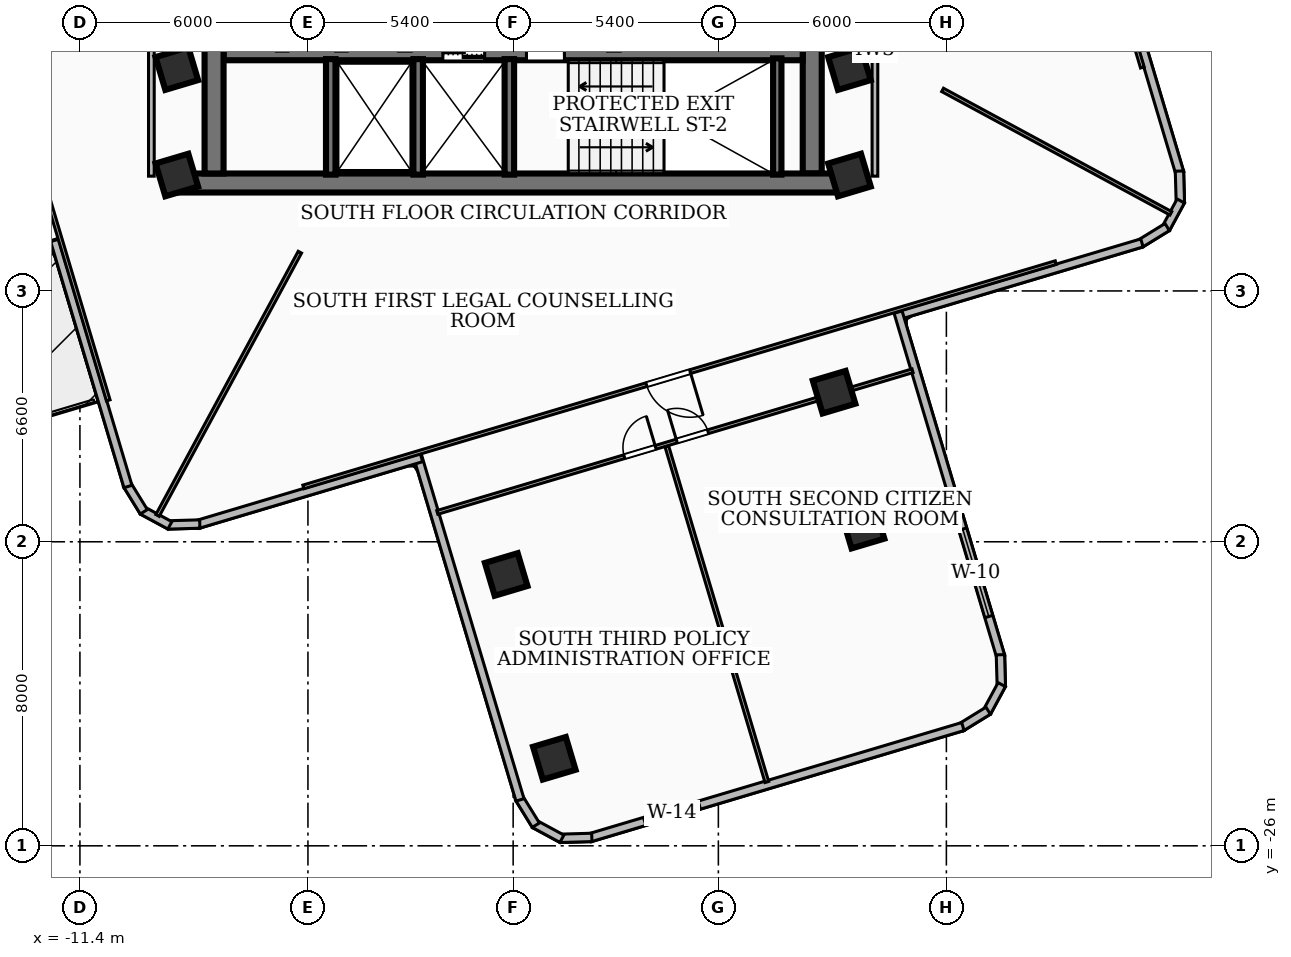
"""IFC4 building model, lengths in metres.
Left out: names, types, materials, properties, quantities, classifications, styles, units other than length and angle.
Written with IfcOpenShell. Run it as: python <this file> out.ifc"""

import sys

from ifc_helpers import new_model, si_unit, direction, frame, frame_2d, origin, origin_2d, place, context, subcontext, project, spatial, rectangle, extrude, element, fill, save


model = new_model("IFC4")
c1 = context("Model", 3, precision=1e-05, world=origin(), true_north=direction((0.0, 1.0)))
c2 = subcontext(c1, "Body", "Model", "MODEL_VIEW")
j1 = project(units=[si_unit("LENGTHUNIT", "METRE"), si_unit("PLANEANGLEUNIT", "RADIAN")], contexts=[c1])
p1 = place(None, origin())
s1 = spatial("IfcSite", under=j1, at=p1, CompositionType="ELEMENT")
p2 = place(p1, origin())
s2 = spatial("IfcBuilding", under=s1, at=p2, CompositionType="ELEMENT")
p3 = place(p2, frame((0.0, 0.0, 145.08)))
s3 = spatial("IfcBuildingStorey", under=s2, at=p3, CompositionType="ELEMENT", Elevation=145.08)
p4 = place(p3, frame((8.78, -8.56, 0.0), z_axis=(0.0, 0.0, 1.0), x_axis=(-1.0, 0.0, 0.0)))
e1 = element("IfcWall", 1, at=p4, inside=s3, PredefinedType="SHEAR", context=c2, shape_type="SweptSolid", body=[
    extrude(rectangle(XDim=17.56, YDim=0.5, at=frame_2d((8.78, 0.0))), origin(), (0.0, 0.0, 1.0), 3.32),
])
for number, where, z_axis, x_axis in (
    (2, (-7.87, -8.31, 0.0), (0.0, 0.0, 1.0), (0.0, 1.0, 0.0)),
    (3, (7.87, -2.0, 0.0), (0.0, 0.0, 1.0), (0.0, -1.0, 0.0)),
):
    element("IfcWall", number, at=place(p3, frame(where, z_axis=z_axis, x_axis=x_axis)), inside=s3, PredefinedType="SHEAR", context=c2, shape_type="SweptSolid", body=[
        extrude(rectangle(XDim=6.31, YDim=0.5, at=frame_2d((3.155, 0.0))), origin(), (0.0, 0.0, 1.0), 3.32),
    ])
p5 = place(p3, frame((-7.62, -5.18, 0.0), z_axis=(0.0, 0.0, 1.0), x_axis=(1.0, 0.0, 0.0)))
e4 = element("IfcWall", 4, at=p5, inside=s3, PredefinedType="SOLIDWALL", context=c2, shape_type="SweptSolid", body=[
    extrude(rectangle(XDim=15.24, YDim=0.3, at=frame_2d((7.62, 0.0))), origin(), (0.0, 0.0, 1.0), 3.32),
])
p6 = place(p5, frame((5.77, 0.0, 0.0)))
e5 = element("IfcOpeningElement", 5, at=p6, cuts=e4, PredefinedType="OPENING", context=c2, shape_type="SweptSolid", body=[
    extrude(rectangle(XDim=1.1, YDim=2.15, at=frame_2d((0.55, 1.075))), frame((0.0, 0.16, 0.0), z_axis=(0.0, -1.0, 0.0), x_axis=(1.0, 0.0, 0.0)), (0.0, 0.0, 1.0), 0.32),
])
p7 = place(p5, frame((7.97, 0.0, 0.0)))
e6 = element("IfcOpeningElement", 6, at=p7, cuts=e4, PredefinedType="OPENING", context=c2, shape_type="SweptSolid", body=[
    extrude(rectangle(XDim=1.0, YDim=2.1, at=frame_2d((0.5, 1.05))), frame((0.0, 0.16, 0.0), z_axis=(0.0, -1.0, 0.0), x_axis=(1.0, 0.0, 0.0)), (0.0, 0.0, 1.0), 0.32),
])
p8 = place(p3, frame((6.95, -8.34, 0.0), z_axis=(0.0, 0.0, 1.0), x_axis=(0.0, 1.0, 0.0)))
e7 = element("IfcWall", 7, at=p8, inside=s3, PredefinedType="SOLIDWALL", context=c2, shape_type="SweptSolid", body=[
    extrude(rectangle(XDim=3.06, YDim=0.22, at=frame_2d((1.53, 0.0))), origin(), (0.0, 0.0, 1.0), 3.32),
])
for number, where, z_axis, x_axis in (
    (8, (-0.1, -8.34, 0.0), (0.0, 0.0, 1.0), (0.0, 1.0, 0.0)),
    (9, (-2.5, -8.34, 0.0), (0.0, 0.0, 1.0), (0.0, 1.0, 0.0)),
    (10, (-4.8, -8.34, 0.0), (0.0, 0.0, 1.0), (0.0, 1.0, 0.0)),
):
    element("IfcWall", number, at=place(p3, frame(where, z_axis=z_axis, x_axis=x_axis)), inside=s3, PredefinedType="SOLIDWALL", context=c2, shape_type="SweptSolid", body=[
        extrude(rectangle(XDim=3.04, YDim=0.25, at=frame_2d((1.52, 0.0))), origin(), (0.0, 0.0, 1.0), 3.32),
    ])
for number, where, z_axis, x_axis in (
    (11, (-8.85, -5.55, 0.0), (0.0, 0.0, 1.0), (0.958, 0.286, 0.0)),
    (12, (8.85, -5.55, 0.0), (0.0, 0.0, 1.0), (0.958, 0.286, 0.0)),
    (13, (8.85, -8.35, 0.0), (0.0, 0.0, 1.0), (0.958, 0.286, 0.0)),
    (14, (-8.85, -8.35, 0.0), (0.0, 0.0, 1.0), (0.958, 0.286, 0.0)),
    (15, (-0.183, -18.86, 0.0), (0.0, 0.0, 1.0), (0.958, 0.286, 0.0)),
    (16, (8.445, -14.064, 0.0), (0.0, 0.0, 1.0), (0.958, 0.286, 0.0)),
    (17, (1.083, -23.697, 0.0), (0.0, 0.0, 1.0), (0.958, 0.286, 0.0)),
    (18, (9.208, -17.615, 0.0), (0.0, 0.0, 1.0), (0.958, 0.286, 0.0)),
):
    element("IfcColumn", number, at=place(p3, frame(where, z_axis=z_axis, x_axis=x_axis)), inside=s3, PredefinedType="COLUMN", context=c2, shape_type="SweptSolid", body=[
        extrude(rectangle(XDim=0.9, YDim=0.9, at=origin_2d()), origin(), (0.0, 0.0, 1.0), 3.6),
    ])
p9 = place(p3, frame((-11.957, -10.129, 0.0), z_axis=(0.0, 0.0, 1.0), x_axis=(-0.958343962332, -0.285616613419, 0.0)))
e19 = element("IfcWall", 19, at=p9, inside=s3, PredefinedType="SOLIDWALL", context=c2, shape_type="SweptSolid", body=[
    extrude(rectangle(XDim=13.458, YDim=0.22, at=frame_2d((6.729, 0.0))), origin(), (0.0, 0.0, 1.0), 3.32),
])
p10 = place(p9, frame((5.0, 0.0, 0.0)))
e20 = element("IfcOpeningElement", 20, at=p10, cuts=e19, PredefinedType="OPENING", context=c2, shape_type="SweptSolid", body=[
    extrude(rectangle(XDim=1.1, YDim=2.1, at=frame_2d((0.55, 1.05))), frame((0.0, 0.12, 0.0), z_axis=(0.0, -1.0, 0.0), x_axis=(1.0, 0.0, 0.0)), (0.0, 0.0, 1.0), 0.24),
])
p11 = place(p3, frame((15.787, -2.412, 0.0), z_axis=(0.0, 0.0, 1.0), x_axis=(0.285712854037, -0.958315274342, 0.0)))
e21 = element("IfcWall", 21, at=p11, inside=s3, PredefinedType="SOLIDWALL", context=c2, shape_type="SweptSolid", body=[
    extrude(rectangle(XDim=6.139, YDim=0.22, at=frame_2d((3.069, 0.0))), origin(), (0.0, 0.0, 1.0), 3.32),
])
p12 = place(p3, frame((17.533, -8.246, 0.0), z_axis=(0.0, 0.0, 1.0), x_axis=(0.028676726094, -0.999588738122, 0.0)))
e22 = element("IfcWall", 22, at=p12, inside=s3, PredefinedType="SOLIDWALL", context=c2, shape_type="SweptSolid", body=[
    extrude(rectangle(XDim=0.834, YDim=0.22, at=frame_2d((0.417, 0.0))), origin(), (0.0, 0.0, 1.0), 3.32),
])
p13 = place(p3, frame((17.568, -9.033, 0.0), z_axis=(0.0, 0.0, 1.0), x_axis=(-0.475928115507, -0.879484183411, 0.0)))
e23 = element("IfcWall", 23, at=p13, inside=s3, PredefinedType="SOLIDWALL", context=c2, shape_type="SweptSolid", body=[
    extrude(rectangle(XDim=0.82, YDim=0.22, at=frame_2d((0.41, 0.0))), origin(), (0.0, 0.0, 1.0), 3.32),
])
p14 = place(p3, frame((17.211, -9.719, 0.0), z_axis=(0.0, 0.0, 1.0), x_axis=(-0.851597982144, -0.524195456684, 0.0)))
e24 = element("IfcWall", 24, at=p14, inside=s3, PredefinedType="SOLIDWALL", context=c2, shape_type="SweptSolid", body=[
    extrude(rectangle(XDim=0.834, YDim=0.22, at=frame_2d((0.417, 0.0))), origin(), (0.0, 0.0, 1.0), 3.32),
])
p15 = place(p3, frame((16.546, -10.136, 0.0), z_axis=(0.0, 0.0, 1.0), x_axis=(-0.958346765514, -0.285607207592, 0.0)))
e25 = element("IfcWall", 25, at=p15, inside=s3, PredefinedType="SOLIDWALL", context=c2, shape_type="SweptSolid", body=[
    extrude(rectangle(XDim=6.757, YDim=0.22, at=frame_2d((3.379, 0.0))), origin(), (0.0, 0.0, 1.0), 3.32),
])
p16 = place(p3, frame((10.129, -11.957, 0.0), z_axis=(0.0, 0.0, 1.0), x_axis=(0.285599672934, -0.958349010966, 0.0)))
e26 = element("IfcWall", 26, at=p16, inside=s3, PredefinedType="SOLIDWALL", context=c2, shape_type="SweptSolid", body=[
    extrude(rectangle(XDim=9.458, YDim=0.22, at=frame_2d((4.729, 0.0))), origin(), (0.0, 0.0, 1.0), 3.32),
])
p17 = place(p16, frame((5.958, 0.0, 0.85)))
e27 = element("IfcOpeningElement", 27, at=p17, cuts=e26, PredefinedType="OPENING", context=c2, shape_type="SweptSolid", body=[
    extrude(rectangle(XDim=2.4, YDim=1.65, at=frame_2d((1.2, 0.825))), frame((0.0, 0.12, 0.0), z_axis=(0.0, -1.0, 0.0), x_axis=(1.0, 0.0, 0.0)), (0.0, 0.0, 1.0), 0.24),
])
p18 = place(p3, frame((12.822, -20.972, 0.0), z_axis=(0.0, 0.0, 1.0), x_axis=(0.028676726094, -0.999588738122, 0.0)))
e28 = element("IfcWall", 28, at=p18, inside=s3, PredefinedType="SOLIDWALL", context=c2, shape_type="SweptSolid", body=[
    extrude(rectangle(XDim=0.834, YDim=0.22, at=frame_2d((0.417, 0.0))), origin(), (0.0, 0.0, 1.0), 3.32),
])
p19 = place(p3, frame((12.857, -21.759, 0.0), z_axis=(0.0, 0.0, 1.0), x_axis=(-0.47569769932, -0.879608832869, 0.0)))
e29 = element("IfcWall", 29, at=p19, inside=s3, PredefinedType="SOLIDWALL", context=c2, shape_type="SweptSolid", body=[
    extrude(rectangle(XDim=0.82, YDim=0.22, at=frame_2d((0.41, 0.0))), origin(), (0.0, 0.0, 1.0), 3.32),
])
p20 = place(p3, frame((12.5, -22.445, 0.0), z_axis=(0.0, 0.0, 1.0), x_axis=(-0.851597982144, -0.524195456684, 0.0)))
e30 = element("IfcWall", 30, at=p20, inside=s3, PredefinedType="SOLIDWALL", context=c2, shape_type="SweptSolid", body=[
    extrude(rectangle(XDim=0.834, YDim=0.22, at=frame_2d((0.417, 0.0))), origin(), (0.0, 0.0, 1.0), 3.32),
])
p21 = place(p3, frame((11.835, -22.862, 0.0), z_axis=(0.0, 0.0, 1.0), x_axis=(-0.958339179484, -0.285632661063, 0.0)))
e31 = element("IfcWall", 31, at=p21, inside=s3, PredefinedType="SOLIDWALL", context=c2, shape_type="SweptSolid", body=[
    extrude(rectangle(XDim=10.24, YDim=0.22, at=frame_2d((5.12, 0.0))), origin(), (0.0, 0.0, 1.0), 3.32),
])
p22 = place(p21, frame((7.238, 0.0, 0.85)))
e32 = element("IfcOpeningElement", 32, at=p22, cuts=e31, PredefinedType="OPENING", context=c2, shape_type="SweptSolid", body=[
    extrude(rectangle(XDim=1.5, YDim=1.5, at=frame_2d((0.75, 0.75))), frame((0.0, 0.12, 0.0), z_axis=(0.0, -1.0, 0.0), x_axis=(1.0, 0.0, 0.0)), (0.0, 0.0, 1.0), 0.24),
])
p23 = place(p3, frame((2.07, -25.779, 0.0), z_axis=(0.0, 0.0, 1.0), x_axis=(-0.999588738122, -0.028676726094, 0.0)))
e33 = element("IfcWall", 33, at=p23, inside=s3, PredefinedType="SOLIDWALL", context=c2, shape_type="SweptSolid", body=[
    extrude(rectangle(XDim=0.834, YDim=0.22, at=frame_2d((0.417, 0.0))), origin(), (0.0, 0.0, 1.0), 3.32),
])
p24 = place(p3, frame((1.283, -25.814, 0.0), z_axis=(0.0, 0.0, 1.0), x_axis=(-0.879608832869, 0.47569769932, 0.0)))
e34 = element("IfcWall", 34, at=p24, inside=s3, PredefinedType="SOLIDWALL", context=c2, shape_type="SweptSolid", body=[
    extrude(rectangle(XDim=0.82, YDim=0.22, at=frame_2d((0.41, 0.0))), origin(), (0.0, 0.0, 1.0), 3.32),
])
p25 = place(p3, frame((0.597, -25.457, 0.0), z_axis=(0.0, 0.0, 1.0), x_axis=(-0.524195456684, 0.851597982144, 0.0)))
e35 = element("IfcWall", 35, at=p25, inside=s3, PredefinedType="SOLIDWALL", context=c2, shape_type="SweptSolid", body=[
    extrude(rectangle(XDim=0.834, YDim=0.22, at=frame_2d((0.417, 0.0))), origin(), (0.0, 0.0, 1.0), 3.32),
])
p26 = place(p3, frame((0.18, -24.792, 0.0), z_axis=(0.0, 0.0, 1.0), x_axis=(-0.28557596478, 0.958356075966, 0.0)))
e36 = element("IfcWall", 36, at=p26, inside=s3, PredefinedType="SOLIDWALL", context=c2, shape_type="SweptSolid", body=[
    extrude(rectangle(XDim=9.458, YDim=0.22, at=frame_2d((4.729, 0.0))), origin(), (0.0, 0.0, 1.0), 2.55),
])
p27 = place(p3, frame((-2.412, -15.787, 0.0), z_axis=(0.0, 0.0, 1.0), x_axis=(-0.958315274342, -0.285712854037, 0.0)))
e37 = element("IfcWall", 37, at=p27, inside=s3, PredefinedType="SOLIDWALL", context=c2, shape_type="SweptSolid", body=[
    extrude(rectangle(XDim=6.139, YDim=0.22, at=frame_2d((3.069, 0.0))), origin(), (0.0, 0.0, 1.0), 2.55),
])
p28 = place(p3, frame((-8.246, -17.533, 0.0), z_axis=(0.0, 0.0, 1.0), x_axis=(-0.999588738122, -0.028676726094, 0.0)))
e38 = element("IfcWall", 38, at=p28, inside=s3, PredefinedType="SOLIDWALL", context=c2, shape_type="SweptSolid", body=[
    extrude(rectangle(XDim=0.834, YDim=0.22, at=frame_2d((0.417, 0.0))), origin(), (0.0, 0.0, 1.0), 3.32),
])
p29 = place(p3, frame((-9.033, -17.568, 0.0), z_axis=(0.0, 0.0, 1.0), x_axis=(-0.879484183411, 0.475928115507, 0.0)))
e39 = element("IfcWall", 39, at=p29, inside=s3, PredefinedType="SOLIDWALL", context=c2, shape_type="SweptSolid", body=[
    extrude(rectangle(XDim=0.82, YDim=0.22, at=frame_2d((0.41, 0.0))), origin(), (0.0, 0.0, 1.0), 3.32),
])
p30 = place(p3, frame((-9.719, -17.211, 0.0), z_axis=(0.0, 0.0, 1.0), x_axis=(-0.524195456684, 0.851597982144, 0.0)))
e40 = element("IfcWall", 40, at=p30, inside=s3, PredefinedType="SOLIDWALL", context=c2, shape_type="SweptSolid", body=[
    extrude(rectangle(XDim=0.834, YDim=0.22, at=frame_2d((0.417, 0.0))), origin(), (0.0, 0.0, 1.0), 3.32),
])
p31 = place(p3, frame((-10.136, -16.546, 0.0), z_axis=(0.0, 0.0, 1.0), x_axis=(-0.285607207592, 0.958346765514, 0.0)))
e41 = element("IfcWall", 41, at=p31, inside=s3, PredefinedType="SOLIDWALL", context=c2, shape_type="SweptSolid", body=[
    extrude(rectangle(XDim=6.757, YDim=0.22, at=frame_2d((3.379, 0.0))), origin(), (0.0, 0.0, 1.0), 3.32),
])
for number, where, z_axis, x_axis in (
    (42, (-9.52, -8.38, 0.0), (0.0, 0.0, 1.0), (0.0, 1.0, 0.0)),
    (43, (9.52, -8.38, 0.0), (0.0, 0.0, 1.0), (0.0, 1.0, 0.0)),
):
    element("IfcWall", number, at=place(p3, frame(where, z_axis=z_axis, x_axis=x_axis)), inside=s3, PredefinedType="PARTITIONING", context=c2, shape_type="SweptSolid", body=[
        extrude(rectangle(XDim=6.63, YDim=0.15, at=frame_2d((3.315, 0.0))), origin(), (0.0, 0.0, 1.0), 2.55),
    ])
p32 = place(p3, frame((-5.612, -10.38, 0.0), z_axis=(0.0, 0.0, 1.0), x_axis=(-0.475666815962, -0.879625534073, 0.0)))
e44 = element("IfcWall", 44, at=p32, inside=s3, PredefinedType="PARTITIONING", context=c2, shape_type="SweptSolid", body=[
    extrude(rectangle(XDim=7.875, YDim=0.1, at=frame_2d((3.938, 0.0))), origin(), (0.0, 0.0, 1.0), 2.55),
])
p33 = place(p3, frame((11.3, -6.11, 0.0), z_axis=(0.0, 0.0, 1.0), x_axis=(0.879653556483, -0.475614991948, 0.0)))
e45 = element("IfcWall", 45, at=p33, inside=s3, PredefinedType="PARTITIONING", context=c2, shape_type="SweptSolid", body=[
    extrude(rectangle(XDim=6.829, YDim=0.1, at=frame_2d((3.414, 0.0))), origin(), (0.0, 0.0, 1.0), 3.32),
])
p34 = place(p3, frame((10.655, 14.279, 0.0), z_axis=(0.0, 0.0, 1.0), x_axis=(0.285665949025, -0.958329257389, 0.0)))
e46 = element("IfcWall", 46, at=p34, inside=s3, PredefinedType="PARTITIONING", context=c2, shape_type="SweptSolid", body=[
    extrude(rectangle(XDim=20.66, YDim=0.1, at=frame_2d((10.33, 0.0))), origin(), (0.0, 0.0, 1.0), 2.55),
])
p35 = place(p34, frame((10.04, 0.0, 0.0)))
e47 = element("IfcOpeningElement", 47, at=p35, cuts=e46, PredefinedType="OPENING", context=c2, shape_type="SweptSolid", body=[
    extrude(rectangle(XDim=1.2, YDim=2.1, at=frame_2d((0.6, 1.05))), frame((0.0, 0.06, 0.0), z_axis=(0.0, -1.0, 0.0), x_axis=(1.0, 0.0, 0.0)), (0.0, 0.0, 1.0), 0.12),
])
p36 = place(p3, frame((-10.655, -14.279, 0.0), z_axis=(0.0, 0.0, 1.0), x_axis=(-0.285665949025, 0.958329257389, 0.0)))
e48 = element("IfcWall", 48, at=p36, inside=s3, PredefinedType="PARTITIONING", context=c2, shape_type="SweptSolid", body=[
    extrude(rectangle(XDim=20.66, YDim=0.1, at=frame_2d((10.33, 0.0))), origin(), (0.0, 0.0, 1.0), 2.55),
])
p37 = place(p36, frame((10.04, 0.0, 0.0)))
e49 = element("IfcOpeningElement", 49, at=p37, cuts=e48, PredefinedType="OPENING", context=c2, shape_type="SweptSolid", body=[
    extrude(rectangle(XDim=1.2, YDim=2.1, at=frame_2d((0.6, 1.05))), frame((0.0, 0.06, 0.0), z_axis=(0.0, -1.0, 0.0), x_axis=(1.0, 0.0, 0.0)), (0.0, 0.0, 1.0), 0.12),
])
p38 = place(p3, frame((14.279, -10.655, 0.0), z_axis=(0.0, 0.0, 1.0), x_axis=(-0.958329257389, -0.285665949025, 0.0)))
e50 = element("IfcWall", 50, at=p38, inside=s3, PredefinedType="PARTITIONING", context=c2, shape_type="SweptSolid", body=[
    extrude(rectangle(XDim=20.66, YDim=0.1, at=frame_2d((10.33, 0.0))), origin(), (0.0, 0.0, 1.0), 2.55),
])
p39 = place(p38, frame((10.04, 0.0, 0.0)))
e51 = element("IfcOpeningElement", 51, at=p39, cuts=e50, PredefinedType="OPENING", context=c2, shape_type="SweptSolid", body=[
    extrude(rectangle(XDim=1.2, YDim=2.1, at=frame_2d((0.6, 1.05))), frame((0.0, 0.06, 0.0), z_axis=(0.0, -1.0, 0.0), x_axis=(1.0, 0.0, 0.0)), (0.0, 0.0, 1.0), 0.12),
])
p40 = place(p3, frame((4.044, -15.49, 0.0), z_axis=(0.0, 0.0, 1.0), x_axis=(0.285631393534, -0.95833955727, 0.0)))
e52 = element("IfcWall", 52, at=p40, inside=s3, PredefinedType="PARTITIONING", context=c2, shape_type="SweptSolid", body=[
    extrude(rectangle(XDim=9.215, YDim=0.1, at=frame_2d((4.607, 0.0))), origin(), (0.0, 0.0, 1.0), 2.812),
])
p41 = place(p3, frame((-1.996, -17.228, 0.0), z_axis=(0.0, 0.0, 1.0), x_axis=(0.958326854981, 0.285674008308, 0.0)))
e53 = element("IfcWall", 53, at=p41, inside=s3, PredefinedType="PARTITIONING", context=c2, shape_type="SweptSolid", body=[
    extrude(rectangle(XDim=13.05, YDim=0.1, at=frame_2d((6.525, 0.0))), origin(), (0.0, 0.0, 1.0), 2.55),
])
p42 = place(p41, frame((5.135, 0.0, 0.0)))
e54 = element("IfcOpeningElement", 54, at=p42, cuts=e53, PredefinedType="OPENING", context=c2, shape_type="SweptSolid", body=[
    extrude(rectangle(XDim=0.86, YDim=2.04, at=frame_2d((0.43, 1.02))), frame((0.0, 0.06, 0.0), z_axis=(0.0, -1.0, 0.0), x_axis=(1.0, 0.0, 0.0)), (0.0, 0.0, 1.0), 0.12),
])
p43 = place(p41, frame((6.575, 0.0, 0.0)))
e55 = element("IfcOpeningElement", 55, at=p43, cuts=e53, PredefinedType="OPENING", context=c2, shape_type="SweptSolid", body=[
    extrude(rectangle(XDim=0.86, YDim=2.04, at=frame_2d((0.43, 1.02))), frame((0.0, 0.06, 0.0), z_axis=(0.0, -1.0, 0.0), x_axis=(1.0, 0.0, 0.0)), (0.0, 0.0, 1.0), 0.12),
])
p44 = place(p17, origin())
e56 = element("IfcWindow", 56, at=p44, inside=s3, PartitioningType="SINGLE_PANEL", PredefinedType="WINDOW", context=c2, shape_type="SweptSolid", body=[
    extrude(rectangle(XDim=2.4, YDim=1.65, at=frame_2d((1.2, 0.825))), frame((0.0, 0.03, 0.0), z_axis=(0.0, -1.0, 0.0), x_axis=(1.0, 0.0, 0.0)), (0.0, 0.0, 1.0), 0.06),
])
fill(e27, e56)
p45 = place(p22, origin())
e57 = element("IfcWindow", 57, at=p45, inside=s3, PartitioningType="SINGLE_PANEL", PredefinedType="WINDOW", context=c2, shape_type="SweptSolid", body=[
    extrude(rectangle(XDim=1.5, YDim=1.5, at=frame_2d((0.75, 0.75))), frame((0.0, 0.03, 0.0), z_axis=(0.0, -1.0, 0.0), x_axis=(1.0, 0.0, 0.0)), (0.0, 0.0, 1.0), 0.06),
])
fill(e32, e57)
p46 = place(p6, origin())
e58 = element("IfcDoor", 58, at=p46, inside=s3, OperationType="DOUBLE_DOOR_SLIDING", PredefinedType="DOOR", context=c2, shape_type="SweptSolid", body=[
    extrude(rectangle(XDim=1.1, YDim=2.15, at=frame_2d((0.55, 1.075))), frame((0.0, 0.025, 0.0), z_axis=(0.0, -1.0, 0.0), x_axis=(1.0, 0.0, 0.0)), (0.0, 0.0, 1.0), 0.05),
])
fill(e5, e58)
p47 = place(p7, origin())
e59 = element("IfcDoor", 59, at=p47, inside=s3, OperationType="SINGLE_SWING_RIGHT", PredefinedType="DOOR", context=c2, shape_type="SweptSolid", body=[
    extrude(rectangle(XDim=1.0, YDim=2.1, at=frame_2d((0.5, 1.05))), frame((0.0, 0.025, 0.0), z_axis=(0.0, -1.0, 0.0), x_axis=(1.0, 0.0, 0.0)), (0.0, 0.0, 1.0), 0.05),
])
fill(e6, e59)
p48 = place(p39, origin())
e60 = element("IfcDoor", 60, at=p48, inside=s3, OperationType="SINGLE_SWING_LEFT", PredefinedType="DOOR", context=c2, shape_type="SweptSolid", body=[
    extrude(rectangle(XDim=1.2, YDim=2.1, at=frame_2d((0.6, 1.05))), frame((0.0, 0.025, 0.0), z_axis=(0.0, -1.0, 0.0), x_axis=(1.0, 0.0, 0.0)), (0.0, 0.0, 1.0), 0.05),
])
fill(e51, e60)
p49 = place(p42, origin())
e61 = element("IfcDoor", 61, at=p49, inside=s3, OperationType="SINGLE_SWING_RIGHT", PredefinedType="DOOR", context=c2, shape_type="SweptSolid", body=[
    extrude(rectangle(XDim=0.86, YDim=2.04, at=frame_2d((0.43, 1.02))), frame((0.0, 0.025, 0.0), z_axis=(0.0, -1.0, 0.0), x_axis=(1.0, 0.0, 0.0)), (0.0, 0.0, 1.0), 0.05),
])
fill(e54, e61)
p50 = place(p43, origin())
e62 = element("IfcDoor", 62, at=p50, inside=s3, OperationType="SINGLE_SWING_LEFT", PredefinedType="DOOR", context=c2, shape_type="SweptSolid", body=[
    extrude(rectangle(XDim=0.86, YDim=2.04, at=frame_2d((0.43, 1.02))), frame((0.0, 0.025, 0.0), z_axis=(0.0, -1.0, 0.0), x_axis=(1.0, 0.0, 0.0)), (0.0, 0.0, 1.0), 0.05),
])
fill(e55, e62)
save(model, sys.argv[1])
